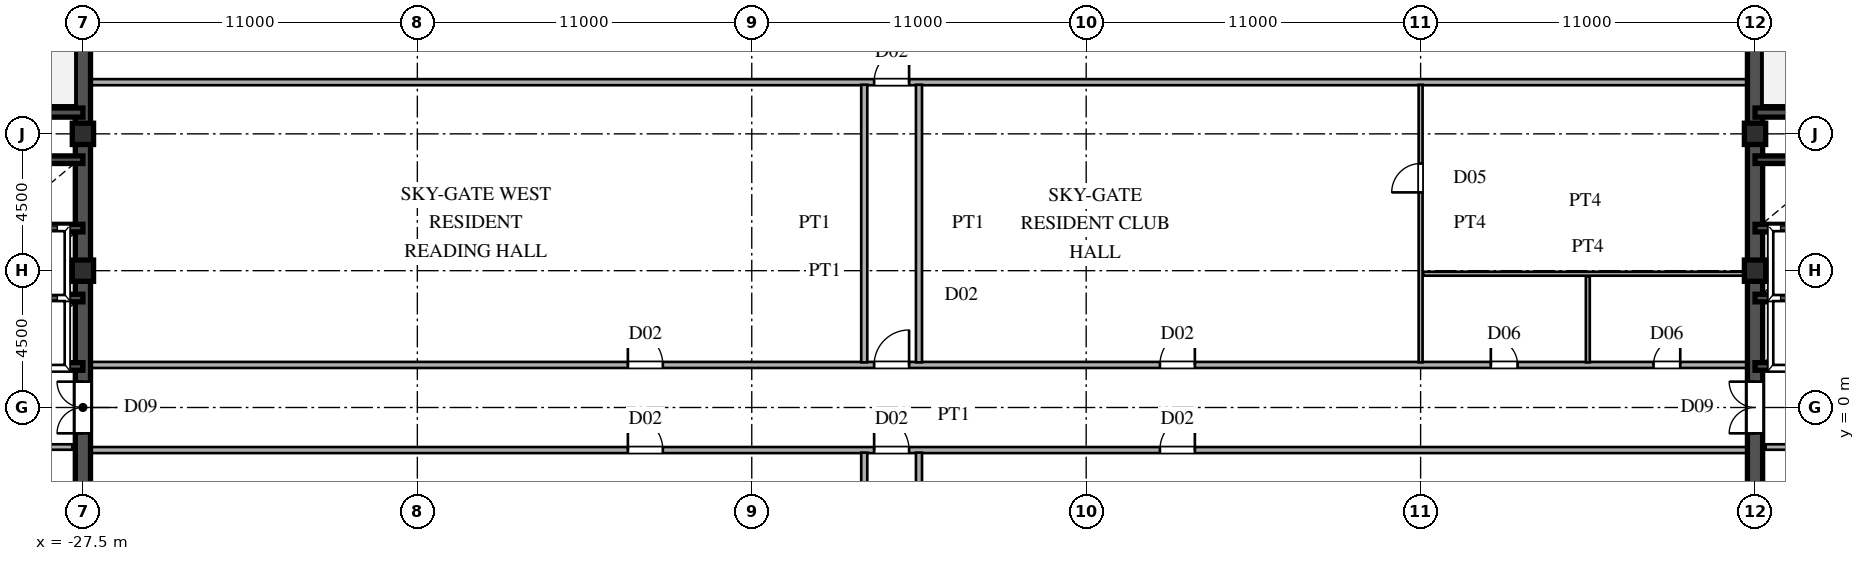
"""IFC4 building model, lengths in metres.
Left out: names, types, materials, properties, quantities, classifications, styles, units other than length and angle.
Written with IfcOpenShell. Run it as: python <this file> out.ifc"""

import sys

from ifc_helpers import new_model, si_unit, direction, frame, frame_2d, origin, origin_2d, place, context, subcontext, project, spatial, rectangle, hollow_rectangle, extrude, source, transform, mapped, element, fill, save


model = new_model("IFC4")
c1 = context("Model", 3, precision=1e-05, world=origin(), true_north=direction((0.0, 1.0)))
c2 = subcontext(c1, "Body", "Model", "MODEL_VIEW")
j1 = project(units=[si_unit("LENGTHUNIT", "METRE"), si_unit("PLANEANGLEUNIT", "RADIAN")], contexts=[c1])
p1 = place(None, origin())
s1 = spatial("IfcSite", under=j1, at=p1, CompositionType="ELEMENT")
p2 = place(p1, origin())
s2 = spatial("IfcBuilding", under=s1, at=p2, CompositionType="ELEMENT")
p3 = place(p2, frame((0.0, 0.0, 229.8)))
s3 = spatial("IfcBuildingStorey", under=s2, at=p3, CompositionType="ELEMENT", Elevation=229.8)
m1 = source(origin(), c2, "Body", "SweptSolid", [
    extrude(hollow_rectangle(XDim=0.7, YDim=0.7, WallThickness=0.03, at=origin_2d()), origin(), (0.0, 0.0, 1.0), 4.8),
])
for number, where, z_axis, x_axis in (
    (1, (-27.5, 4.5, 0.0), (0.0, 0.0, 1.0), (1.0, 0.0, 0.0)),
    (2, (-27.5, 9.0, 0.0), (0.0, 0.0, 1.0), (1.0, 0.0, 0.0)),
    (3, (27.5, 4.5, 0.0), (0.0, 0.0, 1.0), (1.0, 0.0, 0.0)),
    (4, (27.5, 9.0, 0.0), (0.0, 0.0, 1.0), (1.0, 0.0, 0.0)),
):
    element("IfcColumn", number, at=place(p3, frame(where, z_axis=z_axis, x_axis=x_axis)), inside=s3, PredefinedType="COLUMN", context=c2, shape_type="MappedRepresentation", body=[
        mapped(m1, transform((0.0, 0.0, 0.0), scale=1.0)),
    ])
for number, where, z_axis, x_axis in (
    (5, (-27.5, -13.5, 0.0), (0.0, 0.0, 1.0), (0.0, 1.0, 0.0)),
    (6, (-27.5, 1.3, 0.0), (0.0, 0.0, 1.0), (0.0, 1.0, 0.0)),
):
    element("IfcWall", number, at=place(p3, frame(where, z_axis=z_axis, x_axis=x_axis)), inside=s3, PredefinedType="SHEAR", context=c2, shape_type="SweptSolid", body=[
        extrude(rectangle(XDim=12.2, YDim=0.5, at=frame_2d((6.1, 0.0))), origin(), (0.0, 0.0, 1.0), 4.54),
    ])
p4 = place(p3, frame((-27.5, -1.3, 0.0), z_axis=(0.0, 0.0, 1.0), x_axis=(0.0, 1.0, 0.0)))
e7 = element("IfcWall", 7, at=p4, inside=s3, PredefinedType="SHEAR", context=c2, shape_type="SweptSolid", body=[
    extrude(rectangle(XDim=2.6, YDim=0.5, at=frame_2d((1.3, 0.0))), origin(), (0.0, 0.0, 1.0), 4.54),
])
p5 = place(p4, frame((0.45, 0.0, 0.0)))
e8 = element("IfcOpeningElement", 8, at=p5, cuts=e7, PredefinedType="OPENING", context=c2, shape_type="SweptSolid", body=[
    extrude(rectangle(XDim=1.7, YDim=2.35, at=frame_2d((0.85, 1.175))), frame((0.0, 0.26, 0.0), z_axis=(0.0, -1.0, 0.0), x_axis=(1.0, 0.0, 0.0)), (0.0, 0.0, 1.0), 0.52),
])
p6 = place(p3, frame((-36.5, 9.7, 0.0), z_axis=(0.0, 0.0, 1.0), x_axis=(1.0, 0.0, 0.0)))
e9 = element("IfcWall", 9, at=p6, inside=s3, PredefinedType="SHEAR", context=c2, shape_type="SweptSolid", body=[
    extrude(rectangle(XDim=9.0, YDim=0.3, at=frame_2d((4.5, 0.0))), origin(), (0.0, 0.0, 1.0), 4.54),
])
p7 = place(p6, frame((0.6, 0.0, 0.0)))
e10 = element("IfcOpeningElement", 10, at=p7, cuts=e9, PredefinedType="OPENING", context=c2, shape_type="SweptSolid", body=[
    extrude(rectangle(XDim=1.1, YDim=2.2, at=frame_2d((0.55, 1.1))), frame((0.0, 0.16, 0.0), z_axis=(0.0, -1.0, 0.0), x_axis=(1.0, 0.0, 0.0)), (0.0, 0.0, 1.0), 0.32),
])
for number, where, z_axis, x_axis in (
    (11, (-30.3, 1.35, 0.0), (0.0, 0.0, 1.0), (1.0, 0.0, 0.0)),
    (12, (-30.3, 3.6, 0.0), (0.0, 0.0, 1.0), (1.0, 0.0, 0.0)),
    (13, (-30.3, 5.9, 0.0), (0.0, 0.0, 1.0), (1.0, 0.0, 0.0)),
    (14, (-30.3, 8.15, 0.0), (0.0, 0.0, 1.0), (1.0, 0.0, 0.0)),
):
    element("IfcWall", number, at=place(p3, frame(where, z_axis=z_axis, x_axis=x_axis)), inside=s3, PredefinedType="SHEAR", context=c2, shape_type="SweptSolid", body=[
        extrude(rectangle(XDim=2.8, YDim=0.25, at=frame_2d((1.4, 0.0))), origin(), (0.0, 0.0, 1.0), 4.54),
    ])
p8 = place(p3, frame((-33.02, -1.3, 0.0), z_axis=(0.0, 0.0, 1.0), x_axis=(1.0, 0.0, 0.0)))
e15 = element("IfcWall", 15, at=p8, inside=s3, PredefinedType="PARTITIONING", context=c2, shape_type="SweptSolid", body=[
    extrude(rectangle(XDim=5.17, YDim=0.18, at=frame_2d((2.585, 0.0))), origin(), (0.0, 0.0, 1.0), 4.54),
])
p9 = place(p8, frame((2.01, 0.0, 0.0)))
e16 = element("IfcOpeningElement", 16, at=p9, cuts=e15, PredefinedType="OPENING", context=c2, shape_type="SweptSolid", body=[
    extrude(rectangle(XDim=1.15, YDim=2.2, at=frame_2d((0.575, 1.1))), frame((0.0, 0.1, 0.0), z_axis=(0.0, -1.0, 0.0), x_axis=(1.0, 0.0, 0.0)), (0.0, 0.0, 1.0), 0.2),
])
for number, where, z_axis, x_axis in (
    (17, (27.5, -13.5, 0.0), (0.0, 0.0, 1.0), (0.0, 1.0, 0.0)),
    (18, (27.5, 1.3, 0.0), (0.0, 0.0, 1.0), (0.0, 1.0, 0.0)),
):
    element("IfcWall", number, at=place(p3, frame(where, z_axis=z_axis, x_axis=x_axis)), inside=s3, PredefinedType="SHEAR", context=c2, shape_type="SweptSolid", body=[
        extrude(rectangle(XDim=12.2, YDim=0.5, at=frame_2d((6.1, 0.0))), origin(), (0.0, 0.0, 1.0), 4.54),
    ])
p10 = place(p3, frame((27.5, -1.3, 0.0), z_axis=(0.0, 0.0, 1.0), x_axis=(0.0, 1.0, 0.0)))
e19 = element("IfcWall", 19, at=p10, inside=s3, PredefinedType="SHEAR", context=c2, shape_type="SweptSolid", body=[
    extrude(rectangle(XDim=2.6, YDim=0.5, at=frame_2d((1.3, 0.0))), origin(), (0.0, 0.0, 1.0), 4.54),
])
p11 = place(p10, frame((0.45, 0.0, 0.0)))
e20 = element("IfcOpeningElement", 20, at=p11, cuts=e19, PredefinedType="OPENING", context=c2, shape_type="SweptSolid", body=[
    extrude(rectangle(XDim=1.7, YDim=2.35, at=frame_2d((0.85, 1.175))), frame((0.0, 0.26, 0.0), z_axis=(0.0, -1.0, 0.0), x_axis=(1.0, 0.0, 0.0)), (0.0, 0.0, 1.0), 0.52),
])
p12 = place(p3, frame((27.5, 9.7, 0.0), z_axis=(0.0, 0.0, 1.0), x_axis=(1.0, 0.0, 0.0)))
e21 = element("IfcWall", 21, at=p12, inside=s3, PredefinedType="SHEAR", context=c2, shape_type="SweptSolid", body=[
    extrude(rectangle(XDim=9.0, YDim=0.3, at=frame_2d((4.5, 0.0))), origin(), (0.0, 0.0, 1.0), 4.54),
])
p13 = place(p12, frame((7.3, 0.0, 0.0)))
e22 = element("IfcOpeningElement", 22, at=p13, cuts=e21, PredefinedType="OPENING", context=c2, shape_type="SweptSolid", body=[
    extrude(rectangle(XDim=1.1, YDim=2.2, at=frame_2d((0.55, 1.1))), frame((0.0, 0.16, 0.0), z_axis=(0.0, -1.0, 0.0), x_axis=(1.0, 0.0, 0.0)), (0.0, 0.0, 1.0), 0.32),
])
for number, where, z_axis, x_axis in (
    (23, (27.5, 1.35, 0.0), (0.0, 0.0, 1.0), (1.0, 0.0, 0.0)),
    (24, (27.5, 3.6, 0.0), (0.0, 0.0, 1.0), (1.0, 0.0, 0.0)),
    (25, (27.5, 5.9, 0.0), (0.0, 0.0, 1.0), (1.0, 0.0, 0.0)),
    (26, (27.5, 8.15, 0.0), (0.0, 0.0, 1.0), (1.0, 0.0, 0.0)),
):
    element("IfcWall", number, at=place(p3, frame(where, z_axis=z_axis, x_axis=x_axis)), inside=s3, PredefinedType="SHEAR", context=c2, shape_type="SweptSolid", body=[
        extrude(rectangle(XDim=2.8, YDim=0.25, at=frame_2d((1.4, 0.0))), origin(), (0.0, 0.0, 1.0), 4.54),
    ])
p14 = place(p3, frame((27.85, -1.3, 0.0), z_axis=(0.0, 0.0, 1.0), x_axis=(1.0, 0.0, 0.0)))
e27 = element("IfcWall", 27, at=p14, inside=s3, PredefinedType="PARTITIONING", context=c2, shape_type="SweptSolid", body=[
    extrude(rectangle(XDim=5.17, YDim=0.18, at=frame_2d((2.585, 0.0))), origin(), (0.0, 0.0, 1.0), 4.54),
])
p15 = place(p14, frame((2.01, 0.0, 0.0)))
e28 = element("IfcOpeningElement", 28, at=p15, cuts=e27, PredefinedType="OPENING", context=c2, shape_type="SweptSolid", body=[
    extrude(rectangle(XDim=1.15, YDim=2.2, at=frame_2d((0.575, 1.1))), frame((0.0, 0.1, 0.0), z_axis=(0.0, -1.0, 0.0), x_axis=(1.0, 0.0, 0.0)), (0.0, 0.0, 1.0), 0.2),
])
p16 = place(p3, frame((-27.245, -1.4, 0.0), z_axis=(0.0, 0.0, 1.0), x_axis=(1.0, 0.0, 0.0)))
e29 = element("IfcWall", 29, at=p16, inside=s3, PredefinedType="PARTITIONING", context=c2, shape_type="SweptSolid", body=[
    extrude(rectangle(XDim=54.49, YDim=0.2, at=frame_2d((27.245, 0.0))), origin(), (0.0, 0.0, 1.0), 4.54),
])
p17 = place(p16, frame((25.77, 0.0, 0.0)))
e30 = element("IfcOpeningElement", 30, at=p17, cuts=e29, PredefinedType="OPENING", context=c2, shape_type="SweptSolid", body=[
    extrude(rectangle(XDim=1.15, YDim=2.2, at=frame_2d((0.575, 1.1))), frame((0.0, 0.11, 0.0), z_axis=(0.0, -1.0, 0.0), x_axis=(1.0, 0.0, 0.0)), (0.0, 0.0, 1.0), 0.22),
])
p18 = place(p16, frame((17.67, 0.0, 0.0)))
e31 = element("IfcOpeningElement", 31, at=p18, cuts=e29, PredefinedType="OPENING", context=c2, shape_type="SweptSolid", body=[
    extrude(rectangle(XDim=1.15, YDim=2.2, at=frame_2d((0.575, 1.1))), frame((0.0, 0.11, 0.0), z_axis=(0.0, -1.0, 0.0), x_axis=(1.0, 0.0, 0.0)), (0.0, 0.0, 1.0), 0.22),
])
p19 = place(p16, frame((35.17, 0.0, 0.0)))
e32 = element("IfcOpeningElement", 32, at=p19, cuts=e29, PredefinedType="OPENING", context=c2, shape_type="SweptSolid", body=[
    extrude(rectangle(XDim=1.15, YDim=2.2, at=frame_2d((0.575, 1.1))), frame((0.0, 0.11, 0.0), z_axis=(0.0, -1.0, 0.0), x_axis=(1.0, 0.0, 0.0)), (0.0, 0.0, 1.0), 0.22),
])
p20 = place(p3, frame((-27.245, 1.4, 0.0), z_axis=(0.0, 0.0, 1.0), x_axis=(1.0, 0.0, 0.0)))
e33 = element("IfcWall", 33, at=p20, inside=s3, PredefinedType="PARTITIONING", context=c2, shape_type="SweptSolid", body=[
    extrude(rectangle(XDim=54.49, YDim=0.2, at=frame_2d((27.245, 0.0))), origin(), (0.0, 0.0, 1.0), 4.54),
])
p21 = place(p20, frame((25.77, 0.0, 0.0)))
e34 = element("IfcOpeningElement", 34, at=p21, cuts=e33, PredefinedType="OPENING", context=c2, shape_type="SweptSolid", body=[
    extrude(rectangle(XDim=1.15, YDim=2.2, at=frame_2d((0.575, 1.1))), frame((0.0, 0.11, 0.0), z_axis=(0.0, -1.0, 0.0), x_axis=(1.0, 0.0, 0.0)), (0.0, 0.0, 1.0), 0.22),
])
p22 = place(p20, frame((35.17, 0.0, 0.0)))
e35 = element("IfcOpeningElement", 35, at=p22, cuts=e33, PredefinedType="OPENING", context=c2, shape_type="SweptSolid", body=[
    extrude(rectangle(XDim=1.15, YDim=2.2, at=frame_2d((0.575, 1.1))), frame((0.0, 0.11, 0.0), z_axis=(0.0, -1.0, 0.0), x_axis=(1.0, 0.0, 0.0)), (0.0, 0.0, 1.0), 0.22),
])
p23 = place(p20, frame((17.67, 0.0, 0.0)))
e36 = element("IfcOpeningElement", 36, at=p23, cuts=e33, PredefinedType="OPENING", context=c2, shape_type="SweptSolid", body=[
    extrude(rectangle(XDim=1.15, YDim=2.2, at=frame_2d((0.575, 1.1))), frame((0.0, 0.11, 0.0), z_axis=(0.0, -1.0, 0.0), x_axis=(1.0, 0.0, 0.0)), (0.0, 0.0, 1.0), 0.22),
])
p24 = place(p20, frame((46.055, 0.0, 0.0)))
e37 = element("IfcOpeningElement", 37, at=p24, cuts=e33, PredefinedType="OPENING", context=c2, shape_type="SweptSolid", body=[
    extrude(rectangle(XDim=0.88, YDim=2.1, at=frame_2d((0.44, 1.05))), frame((0.0, 0.11, 0.0), z_axis=(0.0, -1.0, 0.0), x_axis=(1.0, 0.0, 0.0)), (0.0, 0.0, 1.0), 0.22),
])
p25 = place(p20, frame((51.405, 0.0, 0.0)))
e38 = element("IfcOpeningElement", 38, at=p25, cuts=e33, PredefinedType="OPENING", context=c2, shape_type="SweptSolid", body=[
    extrude(rectangle(XDim=0.88, YDim=2.1, at=frame_2d((0.44, 1.05))), frame((0.0, 0.11, 0.0), z_axis=(0.0, -1.0, 0.0), x_axis=(1.0, 0.0, 0.0)), (0.0, 0.0, 1.0), 0.22),
])
p26 = place(p3, frame((16.585, 4.4, 0.0), z_axis=(0.0, 0.0, 1.0), x_axis=(1.0, 0.0, 0.0)))
e39 = element("IfcWall", 39, at=p26, inside=s3, PredefinedType="PARTITIONING", context=c2, shape_type="SweptSolid", body=[
    extrude(rectangle(XDim=10.66, YDim=0.13, at=frame_2d((5.33, 0.0))), origin(), (0.0, 0.0, 1.0), 4.54),
])
p27 = place(p3, frame((-27.245, 10.7, 0.0), z_axis=(0.0, 0.0, 1.0), x_axis=(1.0, 0.0, 0.0)))
e40 = element("IfcWall", 40, at=p27, inside=s3, PredefinedType="PARTITIONING", context=c2, shape_type="SweptSolid", body=[
    extrude(rectangle(XDim=54.49, YDim=0.2, at=frame_2d((27.245, 0.0))), origin(), (0.0, 0.0, 1.0), 4.54),
])
p28 = place(p27, frame((25.77, 0.0, 0.0)))
e41 = element("IfcOpeningElement", 41, at=p28, cuts=e40, PredefinedType="OPENING", context=c2, shape_type="SweptSolid", body=[
    extrude(rectangle(XDim=1.15, YDim=2.2, at=frame_2d((0.575, 1.1))), frame((0.0, 0.11, 0.0), z_axis=(0.0, -1.0, 0.0), x_axis=(1.0, 0.0, 0.0)), (0.0, 0.0, 1.0), 0.22),
])
for number, where, z_axis, x_axis in (
    (42, (-1.8, -10.615, 0.0), (0.0, 0.0, 1.0), (0.0, 1.0, 0.0)),
    (43, (-1.8, 1.485, 0.0), (0.0, 0.0, 1.0), (0.0, 1.0, 0.0)),
):
    element("IfcWall", number, at=place(p3, frame(where, z_axis=z_axis, x_axis=x_axis)), inside=s3, PredefinedType="PARTITIONING", context=c2, shape_type="SweptSolid", body=[
        extrude(rectangle(XDim=9.13, YDim=0.2, at=frame_2d((4.565, 0.0))), origin(), (0.0, 0.0, 1.0), 4.54),
    ])
for number, where, z_axis, x_axis in (
    (44, (0.0, -2.98, 0.0), (0.0, 0.0, 1.0), (0.0, 1.0, 0.0)),
    (45, (0.0, 1.485, 0.0), (0.0, 0.0, 1.0), (0.0, 1.0, 0.0)),
):
    element("IfcWall", number, at=place(p3, frame(where, z_axis=z_axis, x_axis=x_axis)), inside=s3, PredefinedType="PARTITIONING", context=c2, shape_type="SweptSolid", body=[
        extrude(rectangle(XDim=1.495, YDim=0.2, at=frame_2d((0.748, 0.0))), origin(), (0.0, 0.0, 1.0), 4.54),
    ])
p29 = place(p3, frame((0.0, 2.98, 0.0), z_axis=(0.0, 0.0, 1.0), x_axis=(0.0, 1.0, 0.0)))
e46 = element("IfcWall", 46, at=p29, inside=s3, PredefinedType="PARTITIONING", context=c2, shape_type="SweptSolid", body=[
    extrude(rectangle(XDim=7.635, YDim=0.2, at=frame_2d((3.817, 0.0))), origin(), (0.0, 0.0, 1.0), 3.44),
])
p30 = place(p3, frame((16.5, 1.485, 0.0), z_axis=(0.0, 0.0, 1.0), x_axis=(0.0, 1.0, 0.0)))
e47 = element("IfcWall", 47, at=p30, inside=s3, PredefinedType="PARTITIONING", context=c2, shape_type="SweptSolid", body=[
    extrude(rectangle(XDim=9.13, YDim=0.13, at=frame_2d((4.565, 0.0))), origin(), (0.0, 0.0, 1.0), 3.44),
])
p31 = place(p30, frame((5.59, 0.0, 0.0)))
e48 = element("IfcOpeningElement", 48, at=p31, cuts=e47, PredefinedType="OPENING", context=c2, shape_type="SweptSolid", body=[
    extrude(rectangle(XDim=0.95, YDim=2.15, at=frame_2d((0.475, 1.075))), frame((0.0, 0.075, 0.0), z_axis=(0.0, -1.0, 0.0), x_axis=(1.0, 0.0, 0.0)), (0.0, 0.0, 1.0), 0.15),
])
p32 = place(p3, frame((22.0, 1.485, 0.0), z_axis=(0.0, 0.0, 1.0), x_axis=(0.0, 1.0, 0.0)))
e49 = element("IfcWall", 49, at=p32, inside=s3, PredefinedType="PARTITIONING", context=c2, shape_type="SweptSolid", body=[
    extrude(rectangle(XDim=2.83, YDim=0.13, at=frame_2d((1.415, 0.0))), origin(), (0.0, 0.0, 1.0), 3.44),
])
m2 = source(origin(), c2, "Body", "SweptSolid", [
    extrude(rectangle(XDim=1.7, YDim=2.35, at=frame_2d((0.85, 1.175))), frame((0.0, 0.025, 0.0), z_axis=(0.0, -1.0, 0.0), x_axis=(1.0, 0.0, 0.0)), (0.0, 0.0, 1.0), 0.05),
])
p33 = place(p5, origin())
e50 = element("IfcDoor", 50, at=p33, inside=s3, OperationType="DOUBLE_SWING_LEFT", PredefinedType="DOOR", context=c2, shape_type="MappedRepresentation", body=[
    mapped(m2, transform((0.0, 0.0, 0.0), scale=1.0)),
])
fill(e8, e50)
p34 = place(p11, origin())
e51 = element("IfcDoor", 51, at=p34, inside=s3, OperationType="DOUBLE_SWING_LEFT", PredefinedType="DOOR", context=c2, shape_type="MappedRepresentation", body=[
    mapped(m2, transform((0.0, 0.0, 0.0), scale=1.0)),
])
fill(e20, e51)
m3 = source(origin(), c2, "Body", "SweptSolid", [
    extrude(rectangle(XDim=1.15, YDim=2.2, at=frame_2d((0.575, 1.1))), frame((0.0, 0.025, 0.0), z_axis=(0.0, -1.0, 0.0), x_axis=(1.0, 0.0, 0.0)), (0.0, 0.0, 1.0), 0.05),
])
p35 = place(p17, origin())
e52 = element("IfcDoor", 52, at=p35, inside=s3, OperationType="SINGLE_SWING_LEFT", PredefinedType="DOOR", context=c2, shape_type="MappedRepresentation", body=[
    mapped(m3, transform((0.0, 0.0, 0.0), scale=1.0)),
])
fill(e30, e52)
p36 = place(p18, origin())
e53 = element("IfcDoor", 53, at=p36, inside=s3, OperationType="SINGLE_SWING_LEFT", PredefinedType="DOOR", context=c2, shape_type="MappedRepresentation", body=[
    mapped(m3, transform((0.0, 0.0, 0.0), scale=1.0)),
])
fill(e31, e53)
p37 = place(p19, origin())
e54 = element("IfcDoor", 54, at=p37, inside=s3, OperationType="SINGLE_SWING_RIGHT", PredefinedType="DOOR", context=c2, shape_type="MappedRepresentation", body=[
    mapped(m3, transform((0.0, 0.0, 0.0), scale=1.0)),
])
fill(e32, e54)
p38 = place(p21, origin())
e55 = element("IfcDoor", 55, at=p38, inside=s3, OperationType="SINGLE_SWING_RIGHT", PredefinedType="DOOR", context=c2, shape_type="MappedRepresentation", body=[
    mapped(m3, transform((0.0, 0.0, 0.0), scale=1.0)),
])
fill(e34, e55)
p39 = place(p22, origin())
e56 = element("IfcDoor", 56, at=p39, inside=s3, OperationType="SINGLE_SWING_RIGHT", PredefinedType="DOOR", context=c2, shape_type="MappedRepresentation", body=[
    mapped(m3, transform((0.0, 0.0, 0.0), scale=1.0)),
])
fill(e35, e56)
p40 = place(p23, origin())
e57 = element("IfcDoor", 57, at=p40, inside=s3, OperationType="SINGLE_SWING_LEFT", PredefinedType="DOOR", context=c2, shape_type="MappedRepresentation", body=[
    mapped(m3, transform((0.0, 0.0, 0.0), scale=1.0)),
])
fill(e36, e57)
m4 = source(origin(), c2, "Body", "SweptSolid", [
    extrude(rectangle(XDim=0.88, YDim=2.1, at=frame_2d((0.44, 1.05))), frame((0.0, 0.025, 0.0), z_axis=(0.0, -1.0, 0.0), x_axis=(1.0, 0.0, 0.0)), (0.0, 0.0, 1.0), 0.05),
])
p41 = place(p24, origin())
e58 = element("IfcDoor", 58, at=p41, inside=s3, OperationType="SINGLE_SWING_LEFT", PredefinedType="DOOR", context=c2, shape_type="MappedRepresentation", body=[
    mapped(m4, transform((0.0, 0.0, 0.0), scale=1.0)),
])
fill(e37, e58)
p42 = place(p25, origin())
e59 = element("IfcDoor", 59, at=p42, inside=s3, OperationType="SINGLE_SWING_RIGHT", PredefinedType="DOOR", context=c2, shape_type="MappedRepresentation", body=[
    mapped(m4, transform((0.0, 0.0, 0.0), scale=1.0)),
])
fill(e38, e59)
p43 = place(p28, origin())
e60 = element("IfcDoor", 60, at=p43, inside=s3, OperationType="SINGLE_SWING_RIGHT", PredefinedType="DOOR", context=c2, shape_type="MappedRepresentation", body=[
    mapped(m3, transform((0.0, 0.0, 0.0), scale=1.0)),
])
fill(e41, e60)
m5 = source(origin(), c2, "Body", "SweptSolid", [
    extrude(rectangle(XDim=0.95, YDim=2.15, at=frame_2d((0.475, 1.075))), frame((0.0, 0.025, 0.0), z_axis=(0.0, -1.0, 0.0), x_axis=(1.0, 0.0, 0.0)), (0.0, 0.0, 1.0), 0.05),
])
p44 = place(p31, origin())
e61 = element("IfcDoor", 61, at=p44, inside=s3, OperationType="SINGLE_SWING_LEFT", PredefinedType="DOOR", context=c2, shape_type="MappedRepresentation", body=[
    mapped(m5, transform((0.0, 0.0, 0.0), scale=1.0)),
])
fill(e48, e61)
save(model, sys.argv[1])
